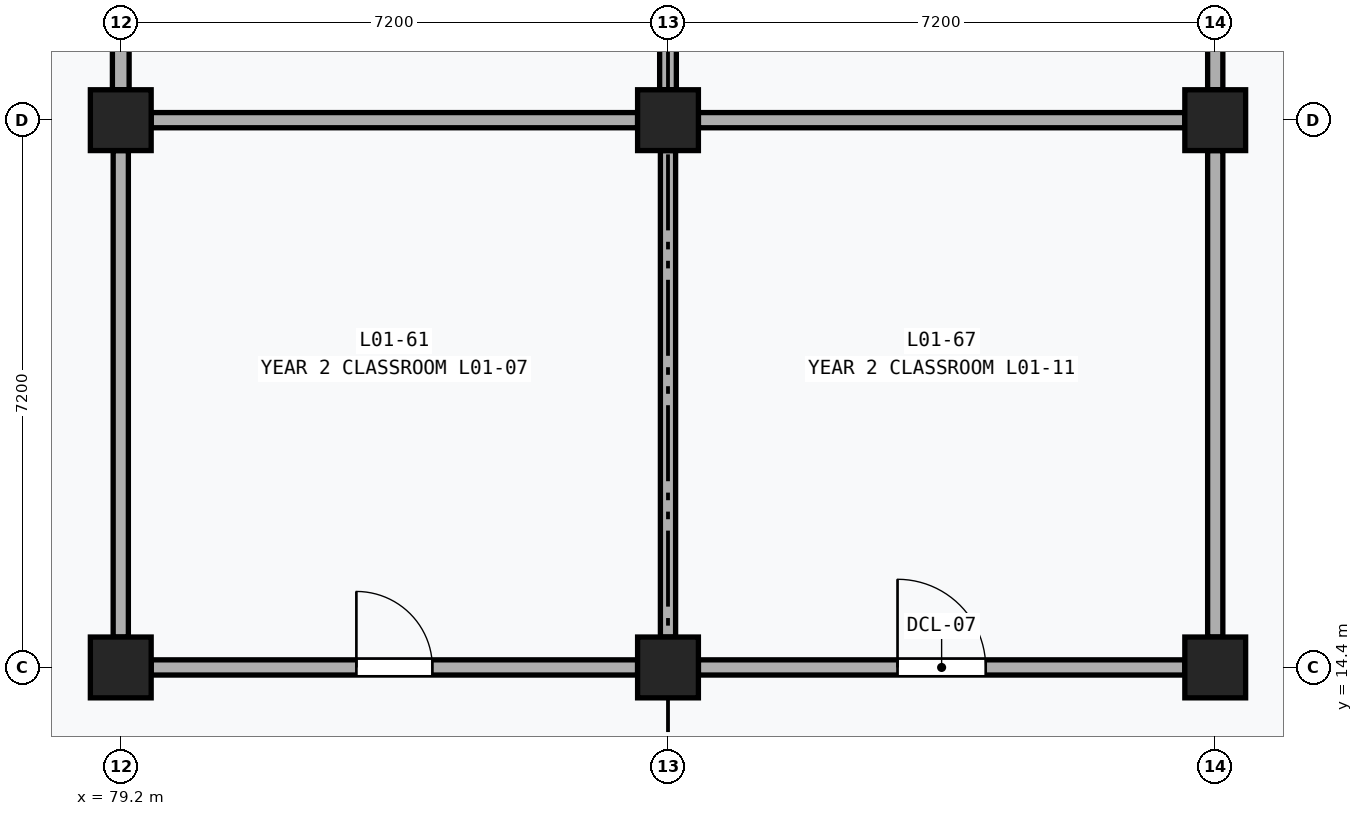
"""IFC4 building model, lengths in metres.
Left out: names, types, materials, properties, quantities, classifications, styles, units other than length and angle.
Written with IfcOpenShell. Run it as: python <this file> out.ifc"""

import sys

from ifc_helpers import new_model, si_unit, direction, frame, frame_2d, origin, origin_2d, place, context, subcontext, project, spatial, rectangle, extrude, element, fill, save


model = new_model("IFC4")
c1 = context("Model", 3, precision=1e-05, world=origin(), true_north=direction((0.0, 1.0)))
c2 = subcontext(c1, "Body", "Model", "MODEL_VIEW")
j1 = project(units=[si_unit("LENGTHUNIT", "METRE"), si_unit("PLANEANGLEUNIT", "RADIAN")], contexts=[c1])
p1 = place(None, origin())
s1 = spatial("IfcSite", under=j1, at=p1, CompositionType="ELEMENT")
p2 = place(p1, origin())
s2 = spatial("IfcBuilding", under=s1, at=p2, CompositionType="ELEMENT")
p3 = place(p2, frame((0.0, 0.0, 4.8)))
s3 = spatial("IfcBuildingStorey", under=s2, at=p3, CompositionType="ELEMENT", Elevation=4.8)
for number, where, z_axis, x_axis in (
    (1, (79.2, 14.4, 0.0), (0.0, 0.0, 1.0), (1.0, 0.0, 0.0)),
    (2, (79.2, 21.6, 0.0), (0.0, 0.0, 1.0), (1.0, 0.0, 0.0)),
    (3, (86.4, 14.4, 0.0), (0.0, 0.0, 1.0), (1.0, 0.0, 0.0)),
    (4, (86.4, 21.6, 0.0), (0.0, 0.0, 1.0), (1.0, 0.0, 0.0)),
    (5, (93.6, 14.4, 0.0), (0.0, 0.0, 1.0), (1.0, 0.0, 0.0)),
    (6, (93.6, 21.6, 0.0), (0.0, 0.0, 1.0), (1.0, 0.0, 0.0)),
):
    element("IfcColumn", number, at=place(p3, frame(where, z_axis=z_axis, x_axis=x_axis)), inside=s3, PredefinedType="COLUMN", context=c2, shape_type="SweptSolid", body=[
        extrude(rectangle(XDim=0.8, YDim=0.8, at=origin_2d()), origin(), (0.0, 0.0, 1.0), 4.8),
    ])
p4 = place(p3, frame((79.6, 14.4, 0.0), z_axis=(0.0, 0.0, 1.0), x_axis=(1.0, 0.0, 0.0)))
e7 = element("IfcWall", 7, at=p4, inside=s3, PredefinedType="PARTITIONING", context=c2, shape_type="SweptSolid", body=[
    extrude(rectangle(XDim=6.4, YDim=0.2, at=frame_2d((3.2, 0.0))), origin(), (0.0, 0.0, 1.0), 3.58),
])
p5 = place(p4, frame((2.7, 0.0, 0.0)))
e8 = element("IfcOpeningElement", 8, at=p5, cuts=e7, PredefinedType="OPENING", context=c2, shape_type="SweptSolid", body=[
    extrude(rectangle(XDim=1.0, YDim=2.1, at=frame_2d((0.5, 1.05))), frame((0.0, 0.112, 0.0), z_axis=(0.0, -1.0, 0.0), x_axis=(1.0, 0.0, 0.0)), (0.0, 0.0, 1.0), 0.224),
])
for number, where, z_axis, x_axis in (
    (9, (79.6, 21.6, 0.0), (0.0, 0.0, 1.0), (1.0, 0.0, 0.0)),
    (10, (79.2, 14.8, 0.0), (0.0, 0.0, 1.0), (0.0, 1.0, 0.0)),
    (11, (86.4, 14.8, 0.0), (0.0, 0.0, 1.0), (0.0, 1.0, 0.0)),
):
    element("IfcWall", number, at=place(p3, frame(where, z_axis=z_axis, x_axis=x_axis)), inside=s3, PredefinedType="PARTITIONING", context=c2, shape_type="SweptSolid", body=[
        extrude(rectangle(XDim=6.4, YDim=0.2, at=frame_2d((3.2, 0.0))), origin(), (0.0, 0.0, 1.0), 3.58),
    ])
p6 = place(p3, frame((79.2, 22.0, 0.0), z_axis=(0.0, 0.0, 1.0), x_axis=(0.0, 1.0, 0.0)))
e12 = element("IfcWall", 12, at=p6, inside=s3, PredefinedType="PARTITIONING", context=c2, shape_type="SweptSolid", body=[
    extrude(rectangle(XDim=6.4, YDim=0.22, at=frame_2d((3.2, 0.0))), origin(), (0.0, 0.0, 1.0), 3.58),
])
p7 = place(p6, frame((2.69, 0.0, 0.0)))
e13 = element("IfcOpeningElement", 13, at=p7, cuts=e12, PredefinedType="OPENING", context=c2, shape_type="SweptSolid", body=[
    extrude(rectangle(XDim=1.02, YDim=2.12, at=frame_2d((0.51, 1.06))), frame((0.0, 0.122, 0.0), z_axis=(0.0, -1.0, 0.0), x_axis=(1.0, 0.0, 0.0)), (0.0, 0.0, 1.0), 0.244),
])
p8 = place(p3, frame((86.4, 22.0, 0.0), z_axis=(0.0, 0.0, 1.0), x_axis=(0.0, 1.0, 0.0)))
e14 = element("IfcWall", 14, at=p8, inside=s3, PredefinedType="PARTITIONING", context=c2, shape_type="SweptSolid", body=[
    extrude(rectangle(XDim=6.4, YDim=0.22, at=frame_2d((3.2, 0.0))), origin(), (0.0, 0.0, 1.0), 3.58),
])
p9 = place(p3, frame((86.8, 14.4, 0.0), z_axis=(0.0, 0.0, 1.0), x_axis=(1.0, 0.0, 0.0)))
e15 = element("IfcWall", 15, at=p9, inside=s3, PredefinedType="PARTITIONING", context=c2, shape_type="SweptSolid", body=[
    extrude(rectangle(XDim=6.4, YDim=0.2, at=frame_2d((3.2, 0.0))), origin(), (0.0, 0.0, 1.0), 3.58),
])
p10 = place(p9, frame((2.62, 0.0, 0.0)))
e16 = element("IfcOpeningElement", 16, at=p10, cuts=e15, PredefinedType="OPENING", context=c2, shape_type="SweptSolid", body=[
    extrude(rectangle(XDim=1.16, YDim=2.22, at=frame_2d((0.58, 1.11))), frame((0.0, 0.112, 0.0), z_axis=(0.0, -1.0, 0.0), x_axis=(1.0, 0.0, 0.0)), (0.0, 0.0, 1.0), 0.224),
])
for number, where, z_axis, x_axis in (
    (17, (86.8, 21.6, 0.0), (0.0, 0.0, 1.0), (1.0, 0.0, 0.0)),
    (18, (93.6, 14.8, 0.0), (0.0, 0.0, 1.0), (0.0, 1.0, 0.0)),
):
    element("IfcWall", number, at=place(p3, frame(where, z_axis=z_axis, x_axis=x_axis)), inside=s3, PredefinedType="PARTITIONING", context=c2, shape_type="SweptSolid", body=[
        extrude(rectangle(XDim=6.4, YDim=0.2, at=frame_2d((3.2, 0.0))), origin(), (0.0, 0.0, 1.0), 3.58),
    ])
p11 = place(p3, frame((93.6, 22.0, 0.0), z_axis=(0.0, 0.0, 1.0), x_axis=(0.0, 1.0, 0.0)))
e19 = element("IfcWall", 19, at=p11, inside=s3, PredefinedType="PARTITIONING", context=c2, shape_type="SweptSolid", body=[
    extrude(rectangle(XDim=6.4, YDim=0.2, at=frame_2d((3.2, 0.0))), origin(), (0.0, 0.0, 1.0), 3.58),
])
p12 = place(p11, frame((2.6, 0.0, 0.0)))
e20 = element("IfcOpeningElement", 20, at=p12, cuts=e19, PredefinedType="OPENING", context=c2, shape_type="SweptSolid", body=[
    extrude(rectangle(XDim=1.2, YDim=2.24, at=frame_2d((0.6, 1.12))), frame((0.0, 0.112, 0.0), z_axis=(0.0, -1.0, 0.0), x_axis=(1.0, 0.0, 0.0)), (0.0, 0.0, 1.0), 0.224),
])
p13 = place(p5, origin())
e21 = element("IfcDoor", 21, at=p13, inside=s3, OperationType="SINGLE_SWING_LEFT", PredefinedType="DOOR", context=c2, shape_type="SweptSolid", body=[
    extrude(rectangle(XDim=1.0, YDim=2.1, at=frame_2d((0.5, 1.05))), frame((0.0, 0.025, 0.0), z_axis=(0.0, -1.0, 0.0), x_axis=(1.0, 0.0, 0.0)), (0.0, 0.0, 1.0), 0.05),
])
fill(e8, e21)
p14 = place(p10, origin())
e22 = element("IfcDoor", 22, at=p14, inside=s3, OperationType="SINGLE_SWING_LEFT", PredefinedType="DOOR", context=c2, shape_type="SweptSolid", body=[
    extrude(rectangle(XDim=1.16, YDim=2.22, at=frame_2d((0.58, 1.11))), frame((0.0, 0.025, 0.0), z_axis=(0.0, -1.0, 0.0), x_axis=(1.0, 0.0, 0.0)), (0.0, 0.0, 1.0), 0.05),
])
fill(e16, e22)
save(model, sys.argv[1])
